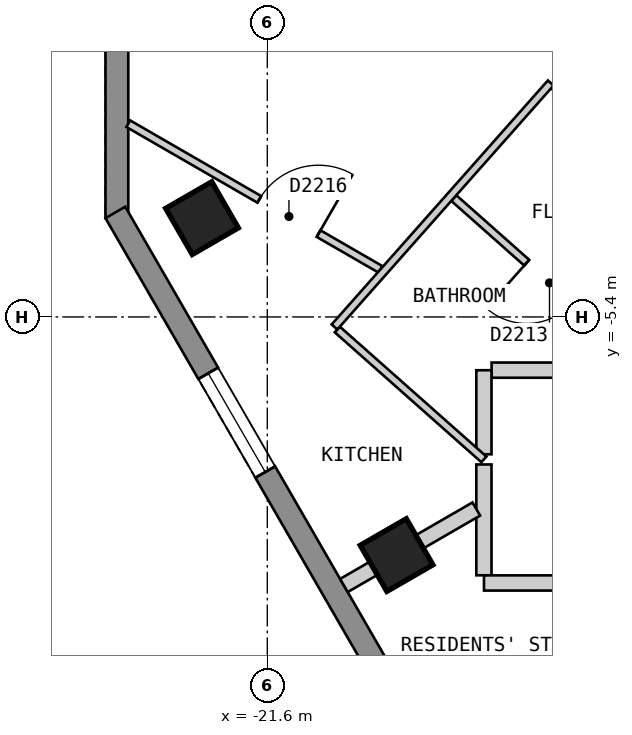
"""IFC4 building model, lengths in metres.
Left out: names, types, materials, properties, quantities, classifications, styles, units other than length and angle.
Written with IfcOpenShell. Run it as: python <this file> out.ifc"""

import sys

from ifc_helpers import new_model, si_unit, direction, frame, frame_2d, origin, origin_2d, place, context, subcontext, project, spatial, polyline, rectangle, outline, extrude, element, fill, save


model = new_model("IFC4")
c1 = context("Model", 3, precision=1e-05, world=origin(), true_north=direction((0.0, 1.0)))
c2 = subcontext(c1, "Body", "Model", "MODEL_VIEW")
j1 = project(units=[si_unit("LENGTHUNIT", "METRE"), si_unit("PLANEANGLEUNIT", "RADIAN")], contexts=[c1])
p1 = place(None, origin())
s1 = spatial("IfcSite", under=j1, at=p1, CompositionType="ELEMENT")
p2 = place(p1, origin())
s2 = spatial("IfcBuilding", under=s1, at=p2, CompositionType="ELEMENT")
p3 = place(p2, frame((0.0, 0.0, 223.8)))
s3 = spatial("IfcBuildingStorey", under=s2, at=p3, CompositionType="ELEMENT", Elevation=223.8)
for number, where, z_axis, x_axis in (
    (1, (-22.459, -4.1, 0.0), (0.0, 0.0, 1.0), (0.5, -0.866, 0.0)),
    (2, (-19.899, -8.533, 0.0), (0.0, 0.0, 1.0), (0.5, -0.866, 0.0)),
):
    element("IfcColumn", number, at=place(p3, frame(where, z_axis=z_axis, x_axis=x_axis)), inside=s3, PredefinedType="COLUMN", context=c2, shape_type="SweptSolid", body=[
        extrude(rectangle(XDim=0.7, YDim=0.7, at=origin_2d()), origin(), (0.0, 0.0, 1.0), 3.0),
    ])
p4 = place(p3, frame((-23.579, 0.9, 0.0), z_axis=(0.0, 0.0, 1.0), x_axis=(0.0, -1.0, 0.0)))
e3 = element("IfcWall", 3, at=p4, inside=s3, PredefinedType="SOLIDWALL", context=c2, shape_type="SweptSolid", body=[
    extrude(outline(polyline([(0.0, -0.15), (5.0, -0.15), (4.92, 0.15), (0.08, 0.15), (0.0, -0.15)])), origin(), (0.0, 0.0, 1.0), 2.7),
])
p5 = place(p4, frame((0.65, 0.0, 0.15)))
e4 = element("IfcOpeningElement", 4, at=p5, cuts=e3, PredefinedType="OPENING", context=c2, shape_type="SweptSolid", body=[
    extrude(rectangle(XDim=1.2, YDim=2.1, at=frame_2d((0.6, 1.05))), frame((0.0, 0.16, 0.0), z_axis=(0.0, -1.0, 0.0), x_axis=(1.0, 0.0, 0.0)), (0.0, 0.0, 1.0), 0.32),
])
p6 = place(p3, frame((-23.599, -4.025, 0.0), z_axis=(0.0, 0.0, 1.0), x_axis=(0.500012653391, -0.866018098222, 0.0)))
e5 = element("IfcWall", 5, at=p6, inside=s3, PredefinedType="SOLIDWALL", context=c2, shape_type="SweptSolid", body=[
    extrude(outline(polyline([(0.0, -0.15), (16.628, -0.15), (16.548, 0.15), (0.08, 0.15), (0.0, -0.15)])), origin(), (0.0, 0.0, 1.0), 2.7),
])
p7 = place(p6, frame((2.444, 0.0, 0.15)))
e6 = element("IfcOpeningElement", 6, at=p7, cuts=e5, PredefinedType="OPENING", context=c2, shape_type="SweptSolid", body=[
    extrude(rectangle(XDim=1.5, YDim=2.1, at=frame_2d((0.75, 1.05))), frame((0.0, 0.16, 0.0), z_axis=(0.0, -1.0, 0.0), x_axis=(1.0, 0.0, 0.0)), (0.0, 0.0, 1.0), 0.32),
])
p8 = place(p6, frame((7.564, 0.0, 0.15)))
e7 = element("IfcOpeningElement", 7, at=p8, cuts=e5, PredefinedType="OPENING", context=c2, shape_type="SweptSolid", body=[
    extrude(rectangle(XDim=1.5, YDim=2.1, at=frame_2d((0.75, 1.05))), frame((0.0, 0.16, 0.0), z_axis=(0.0, -1.0, 0.0), x_axis=(1.0, 0.0, 0.0)), (0.0, 0.0, 1.0), 0.32),
])
p9 = place(p6, frame((12.682, 0.0, 0.15)))
e8 = element("IfcOpeningElement", 8, at=p9, cuts=e5, PredefinedType="OPENING", context=c2, shape_type="SweptSolid", body=[
    extrude(rectangle(XDim=1.5, YDim=2.1, at=frame_2d((0.75, 1.05))), frame((0.0, 0.16, 0.0), z_axis=(0.0, -1.0, 0.0), x_axis=(1.0, 0.0, 0.0)), (0.0, 0.0, 1.0), 0.32),
])
p10 = place(p3, frame((-18.75, -7.341, 0.0), z_axis=(0.0, 0.0, 1.0), x_axis=(0.0, -1.0, 0.0)))
e9 = element("IfcWall", 9, at=p10, inside=s3, PredefinedType="PARTITIONING", context=c2, shape_type="SweptSolid", body=[
    extrude(rectangle(XDim=1.458, YDim=0.2, at=frame_2d((0.729, 0.0))), origin(), (0.0, 0.0, 1.0), 2.7),
])
p11 = place(p3, frame((-18.649, -6.1, 0.0), z_axis=(0.0, 0.0, 1.0), x_axis=(1.0, 0.0, 0.0)))
e10 = element("IfcWall", 10, at=p11, inside=s3, PredefinedType="PARTITIONING", context=c2, shape_type="SweptSolid", body=[
    extrude(rectangle(XDim=2.548, YDim=0.2, at=frame_2d((1.274, 0.0))), origin(), (0.0, 0.0, 1.0), 2.7),
])
p12 = place(p3, frame((-18.749, -8.9, 0.0), z_axis=(0.0, 0.0, 1.0), x_axis=(1.0, 0.0, 0.0)))
e11 = element("IfcWall", 11, at=p12, inside=s3, PredefinedType="PARTITIONING", context=c2, shape_type="SweptSolid", body=[
    extrude(rectangle(XDim=2.699, YDim=0.2, at=frame_2d((1.35, 0.0))), origin(), (0.0, 0.0, 1.0), 2.7),
])
p13 = place(p12, frame((0.919, 0.0, 0.0)))
e12 = element("IfcOpeningElement", 12, at=p13, cuts=e11, PredefinedType="OPENING", context=c2, shape_type="SweptSolid", body=[
    extrude(rectangle(XDim=0.8, YDim=2.1, at=frame_2d((0.4, 1.05))), frame((0.0, 0.11, 0.0), z_axis=(0.0, -1.0, 0.0), x_axis=(1.0, 0.0, 0.0)), (0.0, 0.0, 1.0), 0.22),
])
p14 = place(p3, frame((-18.75, -7.207, 0.0), z_axis=(0.0, 0.0, 1.0), x_axis=(0.0, 1.0, 0.0)))
e13 = element("IfcWall", 13, at=p14, inside=s3, PredefinedType="PARTITIONING", context=c2, shape_type="SweptSolid", body=[
    extrude(rectangle(XDim=1.106, YDim=0.2, at=frame_2d((0.553, 0.0))), origin(), (0.0, 0.0, 1.0), 2.7),
])
p15 = place(p3, frame((-23.429, -2.858, 0.0), z_axis=(0.0, 0.0, 1.0), x_axis=(0.8659754619, -0.500086491905, 0.0)))
e14 = element("IfcWall", 14, at=p15, inside=s3, PredefinedType="PARTITIONING", context=c2, shape_type="SweptSolid", body=[
    extrude(rectangle(XDim=3.831, YDim=0.1, at=frame_2d((1.916, 0.0))), origin(), (0.0, 0.0, 1.0), 2.7),
])
p16 = place(p15, frame((1.991, 0.0, 0.0)))
e15 = element("IfcOpeningElement", 15, at=p16, cuts=e14, PredefinedType="OPENING", context=c2, shape_type="SweptSolid", body=[
    extrude(rectangle(XDim=0.9, YDim=2.1, at=frame_2d((0.45, 1.05))), frame((0.0, 0.06, 0.0), z_axis=(0.0, -1.0, 0.0), x_axis=(1.0, 0.0, 0.0)), (0.0, 0.0, 1.0), 0.12),
])
p17 = place(p3, frame((-17.833, -2.355, 0.0), z_axis=(0.0, 0.0, 1.0), x_axis=(0.748577710953, -0.663047065196, 0.0)))
e16 = element("IfcWall", 16, at=p17, inside=s3, PredefinedType="PARTITIONING", context=c2, shape_type="SweptSolid", body=[
    extrude(rectangle(XDim=2.315, YDim=0.1, at=frame_2d((1.157, 0.0))), origin(), (0.0, 0.0, 1.0), 2.7),
])
p18 = place(p17, frame((0.749, 0.0, 0.0)))
e17 = element("IfcOpeningElement", 17, at=p18, cuts=e16, PredefinedType="OPENING", context=c2, shape_type="SweptSolid", body=[
    extrude(rectangle(XDim=0.9, YDim=2.1, at=frame_2d((0.45, 1.05))), frame((0.0, 0.06, 0.0), z_axis=(0.0, -1.0, 0.0), x_axis=(1.0, 0.0, 0.0)), (0.0, 0.0, 1.0), 0.12),
])
p19 = place(p3, frame((-19.146, -3.836, 0.0), z_axis=(0.0, 0.0, 1.0), x_axis=(0.748267567437, -0.663397051186, 0.0)))
e18 = element("IfcWall", 18, at=p19, inside=s3, PredefinedType="PARTITIONING", context=c2, shape_type="SweptSolid", body=[
    extrude(rectangle(XDim=3.262, YDim=0.1, at=frame_2d((1.631, 0.0))), origin(), (0.0, 0.0, 1.0), 2.7),
])
p20 = place(p19, frame((1.282, 0.0, 0.0)))
e19 = element("IfcOpeningElement", 19, at=p20, cuts=e18, PredefinedType="OPENING", context=c2, shape_type="SweptSolid", body=[
    extrude(rectangle(XDim=0.8, YDim=2.1, at=frame_2d((0.4, 1.05))), frame((0.0, 0.06, 0.0), z_axis=(0.0, -1.0, 0.0), x_axis=(1.0, 0.0, 0.0)), (0.0, 0.0, 1.0), 0.12),
])
p21 = place(p3, frame((-20.679, -5.565, 0.0), z_axis=(0.0, 0.0, 1.0), x_axis=(0.748495475416, -0.663139897217, 0.0)))
e20 = element("IfcWall", 20, at=p21, inside=s3, PredefinedType="PARTITIONING", context=c2, shape_type="SweptSolid", body=[
    extrude(rectangle(XDim=2.577, YDim=0.1, at=frame_2d((1.289, 0.0))), origin(), (0.0, 0.0, 1.0), 2.7),
])
p22 = place(p3, frame((-20.716, -5.532, 0.0), z_axis=(0.0, 0.0, 1.0), x_axis=(0.663278535613, 0.748372623895, 0.0)))
e21 = element("IfcWall", 21, at=p22, inside=s3, PredefinedType="PARTITIONING", context=c2, shape_type="SweptSolid", body=[
    extrude(rectangle(XDim=4.289, YDim=0.1, at=frame_2d((2.145, 0.0))), origin(), (0.0, 0.0, 1.0), 2.7),
])
p23 = place(p3, frame((-20.592, -8.933, 0.0), z_axis=(0.0, 0.0, 1.0), x_axis=(0.865941000796, 0.500146161777, 0.0)))
e22 = element("IfcWall", 22, at=p23, inside=s3, PredefinedType="PARTITIONING", context=c2, shape_type="SweptSolid", body=[
    extrude(rectangle(XDim=2.012, YDim=0.2, at=frame_2d((1.006, 0.0))), origin(), (0.0, 0.0, 1.0), 2.7),
])
p24 = place(p7, origin())
e23 = element("IfcWindow", 23, at=p24, inside=s3, PartitioningType="SINGLE_PANEL", PredefinedType="WINDOW", context=c2, shape_type="SweptSolid", body=[
    extrude(rectangle(XDim=1.5, YDim=2.1, at=frame_2d((0.75, 1.05))), frame((0.0, 0.03, 0.0), z_axis=(0.0, -1.0, 0.0), x_axis=(1.0, 0.0, 0.0)), (0.0, 0.0, 1.0), 0.06),
])
fill(e6, e23)
p25 = place(p20, origin())
e24 = element("IfcDoor", 24, at=p25, inside=s3, OperationType="SINGLE_SWING_LEFT", PredefinedType="DOOR", context=c2, shape_type="SweptSolid", body=[
    extrude(rectangle(XDim=0.8, YDim=2.1, at=frame_2d((0.4, 1.05))), frame((0.0, 0.025, 0.0), z_axis=(0.0, -1.0, 0.0), x_axis=(1.0, 0.0, 0.0)), (0.0, 0.0, 1.0), 0.05),
])
fill(e19, e24)
p26 = place(p16, origin())
e25 = element("IfcDoor", 25, at=p26, inside=s3, OperationType="SINGLE_SWING_RIGHT", PredefinedType="DOOR", context=c2, shape_type="SweptSolid", body=[
    extrude(rectangle(XDim=0.9, YDim=2.1, at=frame_2d((0.45, 1.05))), frame((0.0, 0.025, 0.0), z_axis=(0.0, -1.0, 0.0), x_axis=(1.0, 0.0, 0.0)), (0.0, 0.0, 1.0), 0.05),
])
fill(e15, e25)
save(model, sys.argv[1])
